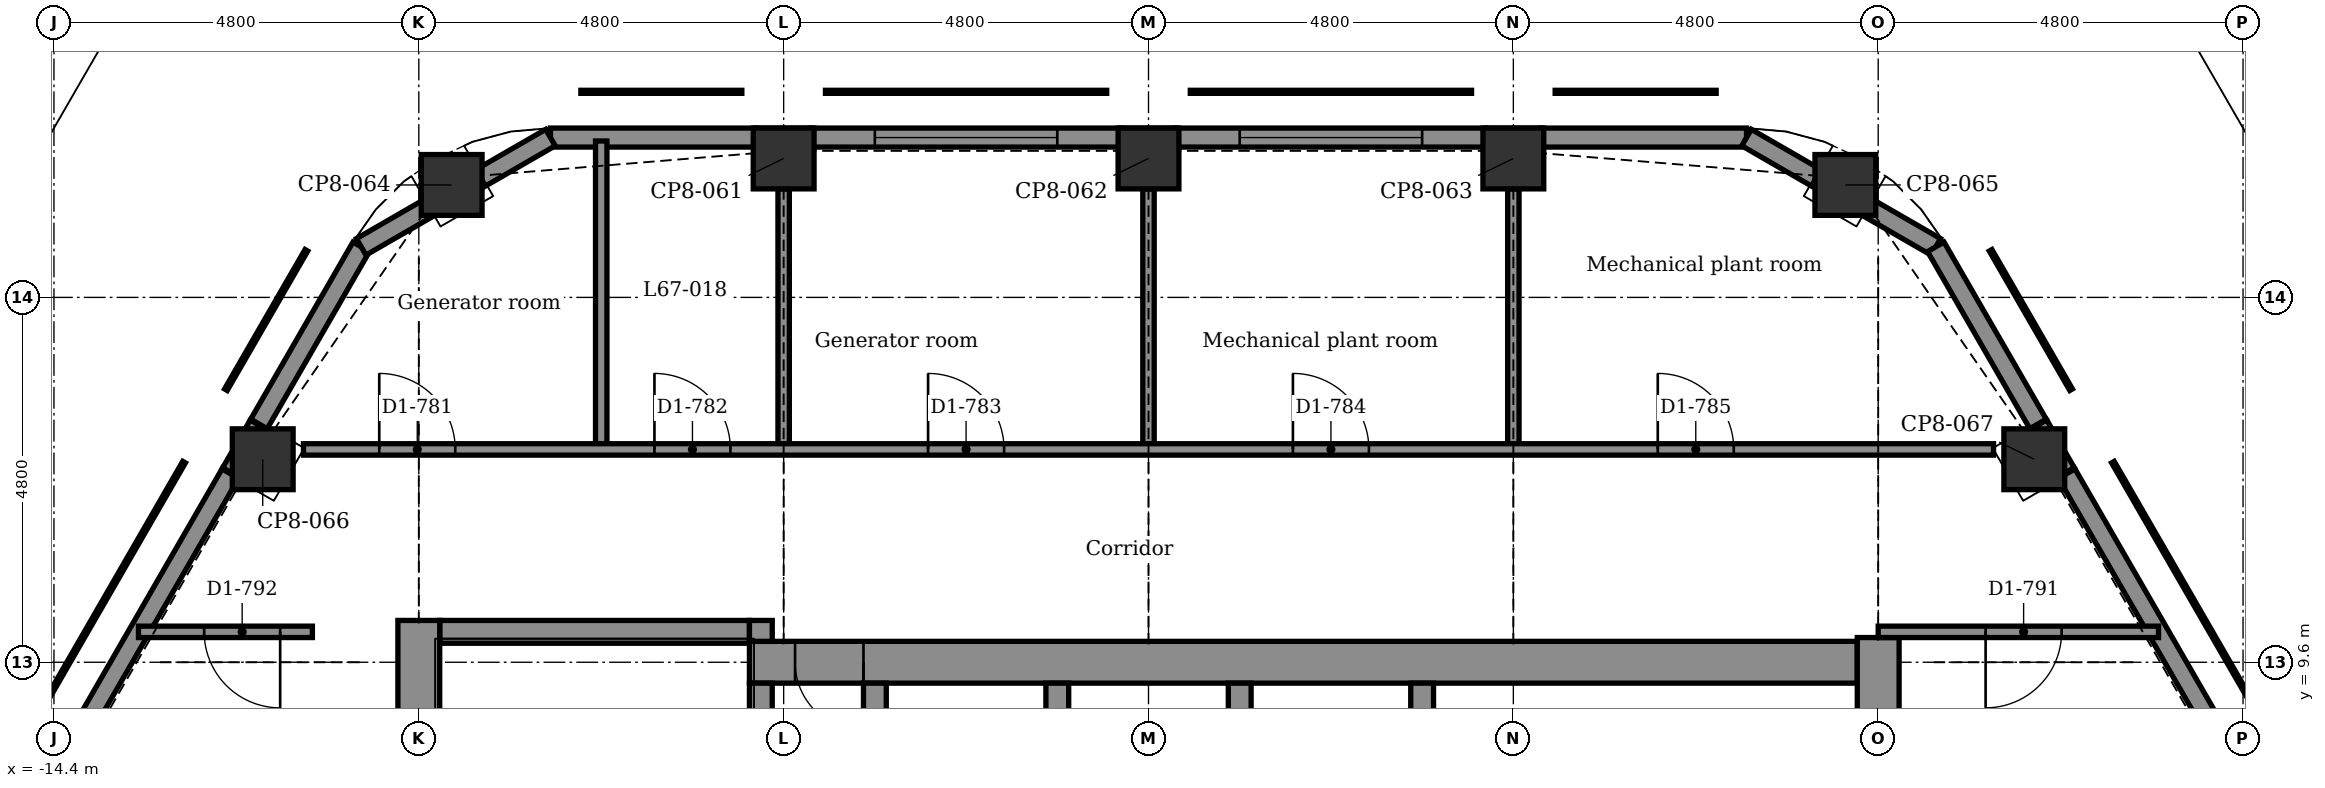
"""IFC4 building model, lengths in metres.
Left out: names, types, materials, properties, quantities, classifications, styles, units other than length and angle.
Written with IfcOpenShell. Run it as: python <this file> out.ifc"""

import sys

from ifc_helpers import new_model, si_unit, direction, frame, frame_2d, origin, origin_2d, place, context, subcontext, project, spatial, rectangle, extrude, element, fill, save


model = new_model("IFC4")
c1 = context("Model", 3, precision=1e-05, world=origin(), true_north=direction((0.0, 1.0)))
c2 = subcontext(c1, "Body", "Model", "MODEL_VIEW")
j1 = project(units=[si_unit("LENGTHUNIT", "METRE"), si_unit("PLANEANGLEUNIT", "RADIAN")], contexts=[c1])
p1 = place(None, origin())
s1 = spatial("IfcSite", under=j1, at=p1, CompositionType="ELEMENT")
p2 = place(p1, origin())
s2 = spatial("IfcBuilding", under=s1, at=p2, CompositionType="ELEMENT")
p3 = place(p2, frame((0.0, 0.0, 296.9)))
s3 = spatial("IfcBuildingStorey", under=s2, at=p3, CompositionType="ELEMENT", Elevation=296.9)
for number, where, z_axis, x_axis in (
    (1, (-9.168, 15.879, -0.3), (0.0, 0.0, 1.0), (0.866, 0.5, 0.0)),
    (2, (-4.8, 16.228, -0.3), (0.0, 0.0, 1.0), (1.0, 0.0, 0.0)),
    (3, (0.0, 16.228, -0.3), (0.0, 0.0, 1.0), (1.0, 0.0, 0.0)),
    (4, (4.8, 16.228, -0.3), (0.0, 0.0, 1.0), (1.0, 0.0, 0.0)),
    (5, (9.168, 15.879, -0.3), (0.0, 0.0, 1.0), (0.5, 0.866, 0.0)),
    (6, (11.654, 12.271, -0.3), (0.0, 0.0, 1.0), (0.866, 0.5, 0.0)),
    (7, (-11.654, 12.271, -0.3), (0.0, 0.0, 1.0), (0.5, 0.866, 0.0)),
):
    element("IfcColumn", number, at=place(p3, frame(where, z_axis=z_axis, x_axis=x_axis)), inside=s3, PredefinedType="COLUMN", context=c2, shape_type="SweptSolid", body=[
        extrude(rectangle(XDim=0.8, YDim=0.8, at=origin_2d()), origin(), (0.0, 0.0, 1.0), 5.0),
    ])
p4 = place(p3, frame((-5.25, 9.6, -0.3), z_axis=(0.0, 0.0, 1.0), x_axis=(1.0, 0.0, 0.0)))
e8 = element("IfcWall", 8, at=p4, inside=s3, PredefinedType="SHEAR", context=c2, shape_type="SweptSolid", body=[
    extrude(rectangle(XDim=14.575, YDim=0.55, at=frame_2d((7.288, 0.0))), origin(), (0.0, 0.0, 1.0), 5.0),
])
p5 = place(p4, frame((0.6, 0.0, 0.3)))
e9 = element("IfcOpeningElement", 9, at=p5, cuts=e8, PredefinedType="OPENING", context=c2, shape_type="SweptSolid", body=[
    extrude(rectangle(XDim=0.9, YDim=2.1, at=frame_2d((0.45, 1.05))), frame((0.0, 0.285, 0.0), z_axis=(0.0, -1.0, 0.0), x_axis=(1.0, 0.0, 0.0)), (0.0, 0.0, 1.0), 0.57),
])
p6 = place(p3, frame((-9.325, 10.0, -0.3), z_axis=(0.0, 0.0, 1.0), x_axis=(1.0, 0.0, 0.0)))
e10 = element("IfcWall", 10, at=p6, inside=s3, PredefinedType="STANDARD", context=c2, shape_type="SweptSolid", body=[
    extrude(rectangle(XDim=4.075, YDim=0.3, at=frame_2d((2.038, 0.0))), origin(), (0.0, 0.0, 1.0), 5.0),
])
p7 = place(p3, frame((-9.6, 2.55, -0.3), z_axis=(0.0, 0.0, 1.0), x_axis=(0.0, 1.0, 0.0)))
e11 = element("IfcWall", 11, at=p7, inside=s3, PredefinedType="SHEAR", context=c2, shape_type="SweptSolid", body=[
    extrude(rectangle(XDim=7.6, YDim=0.55, at=frame_2d((3.8, 0.0))), origin(), (0.0, 0.0, 1.0), 5.0),
])
p8 = place(p3, frame((-5.1, 2.25, -0.3), z_axis=(0.0, 0.0, 1.0), x_axis=(0.0, 1.0, 0.0)))
e12 = element("IfcWall", 12, at=p8, inside=s3, PredefinedType="STANDARD", context=c2, shape_type="SweptSolid", body=[
    extrude(rectangle(XDim=7.075, YDim=0.3, at=frame_2d((3.538, 0.0))), origin(), (0.0, 0.0, 1.0), 5.0),
])
p9 = place(p8, frame((2.0, 0.0, 0.3)))
e13 = element("IfcOpeningElement", 13, at=p9, cuts=e12, PredefinedType="OPENING", context=c2, shape_type="SweptSolid", body=[
    extrude(rectangle(XDim=1.2, YDim=2.1, at=frame_2d((0.6, 1.05))), frame((0.0, 0.16, 0.0), z_axis=(0.0, -1.0, 0.0), x_axis=(1.0, 0.0, 0.0)), (0.0, 0.0, 1.0), 0.32),
])
p10 = place(p3, frame((-5.1, 9.875, -0.3), z_axis=(0.0, 0.0, 1.0), x_axis=(0.0, 1.0, 0.0)))
e14 = element("IfcWall", 14, at=p10, inside=s3, PredefinedType="STANDARD", context=c2, shape_type="SweptSolid", body=[
    extrude(rectangle(XDim=0.275, YDim=0.3, at=frame_2d((0.137, 0.0))), origin(), (0.0, 0.0, 1.0), 5.0),
])
for number, where, z_axis, x_axis in (
    (15, (-3.6, 5.85, -0.3), (0.0, 0.0, 1.0), (0.0, 1.0, 0.0)),
    (16, (-1.2, 5.85, -0.3), (0.0, 0.0, 1.0), (0.0, 1.0, 0.0)),
    (17, (1.2, 5.85, -0.3), (0.0, 0.0, 1.0), (0.0, 1.0, 0.0)),
    (18, (3.6, 5.85, -0.3), (0.0, 0.0, 1.0), (0.0, 1.0, 0.0)),
):
    element("IfcWall", number, at=place(p3, frame(where, z_axis=z_axis, x_axis=x_axis)), inside=s3, PredefinedType="STANDARD", context=c2, shape_type="SweptSolid", body=[
        extrude(rectangle(XDim=3.475, YDim=0.3, at=frame_2d((1.737, 0.0))), origin(), (0.0, 0.0, 1.0), 0.8),
    ])
p11 = place(p3, frame((9.6, -10.15, -0.3), z_axis=(0.0, 0.0, 1.0), x_axis=(0.0, 1.0, 0.0)))
e19 = element("IfcWall", 19, at=p11, inside=s3, PredefinedType="SHEAR", context=c2, shape_type="SweptSolid", body=[
    extrude(rectangle(XDim=20.075, YDim=0.55, at=frame_2d((10.038, 0.0))), origin(), (0.0, 0.0, 1.0), 5.0),
])
p12 = place(p3, frame((-4.44, 16.503, 0.0), z_axis=(0.0, 0.0, 1.0), x_axis=(1.0, 0.0, 0.0)))
e20 = element("IfcWall", 20, at=p12, inside=s3, PredefinedType="SOLIDWALL", context=c2, shape_type="SweptSolid", body=[
    extrude(rectangle(XDim=4.08, YDim=0.25, at=frame_2d((2.04, 0.0))), origin(), (0.0, 0.0, 1.0), 3.8),
])
p13 = place(p12, frame((0.84, 0.0, 0.6)))
e21 = element("IfcOpeningElement", 21, at=p13, cuts=e20, PredefinedType="OPENING", context=c2, shape_type="SweptSolid", body=[
    extrude(rectangle(XDim=2.4, YDim=3.0, at=frame_2d((1.2, 1.5))), frame((0.0, 0.135, 0.0), z_axis=(0.0, -1.0, 0.0), x_axis=(1.0, 0.0, 0.0)), (0.0, 0.0, 1.0), 0.27),
])
p14 = place(p3, frame((-7.868, 16.503, 0.0), z_axis=(0.0, 0.0, 1.0), x_axis=(1.0, 0.0, 0.0)))
e22 = element("IfcWall", 22, at=p14, inside=s3, PredefinedType="SOLIDWALL", context=c2, shape_type="SweptSolid", body=[
    extrude(rectangle(XDim=2.701, YDim=0.25, at=frame_2d((1.351, 0.0))), origin(), (0.0, 0.0, 1.0), 3.8),
])
p15 = place(p3, frame((-5.167, 16.503, 0.0), z_axis=(0.0, 0.0, 1.0), x_axis=(1.0, 0.0, 0.0)))
e23 = element("IfcWall", 23, at=p15, inside=s3, PredefinedType="SOLIDWALL", context=c2, shape_type="SweptSolid", body=[
    extrude(rectangle(XDim=0.727, YDim=0.25, at=frame_2d((0.363, 0.0))), origin(), (0.0, 0.0, 1.0), 4.7),
])
p16 = place(p3, frame((-0.36, 16.503, 0.0), z_axis=(0.0, 0.0, 1.0), x_axis=(1.0, 0.0, 0.0)))
e24 = element("IfcWall", 24, at=p16, inside=s3, PredefinedType="SOLIDWALL", context=c2, shape_type="SweptSolid", body=[
    extrude(rectangle(XDim=0.72, YDim=0.25, at=frame_2d((0.36, 0.0))), origin(), (0.0, 0.0, 1.0), 4.7),
])
p17 = place(p3, frame((0.36, 16.503, 0.0), z_axis=(0.0, 0.0, 1.0), x_axis=(1.0, 0.0, 0.0)))
e25 = element("IfcWall", 25, at=p17, inside=s3, PredefinedType="SOLIDWALL", context=c2, shape_type="SweptSolid", body=[
    extrude(rectangle(XDim=4.08, YDim=0.25, at=frame_2d((2.04, 0.0))), origin(), (0.0, 0.0, 1.0), 3.8),
])
p18 = place(p17, frame((0.84, 0.0, 0.6)))
e26 = element("IfcOpeningElement", 26, at=p18, cuts=e25, PredefinedType="OPENING", context=c2, shape_type="SweptSolid", body=[
    extrude(rectangle(XDim=2.4, YDim=3.0, at=frame_2d((1.2, 1.5))), frame((0.0, 0.135, 0.0), z_axis=(0.0, -1.0, 0.0), x_axis=(1.0, 0.0, 0.0)), (0.0, 0.0, 1.0), 0.27),
])
p19 = place(p3, frame((4.44, 16.503, 0.0), z_axis=(0.0, 0.0, 1.0), x_axis=(1.0, 0.0, 0.0)))
e27 = element("IfcWall", 27, at=p19, inside=s3, PredefinedType="SOLIDWALL", context=c2, shape_type="SweptSolid", body=[
    extrude(rectangle(XDim=0.727, YDim=0.25, at=frame_2d((0.363, 0.0))), origin(), (0.0, 0.0, 1.0), 4.7),
])
p20 = place(p3, frame((5.167, 16.503, 0.0), z_axis=(0.0, 0.0, 1.0), x_axis=(1.0, 0.0, 0.0)))
e28 = element("IfcWall", 28, at=p20, inside=s3, PredefinedType="SOLIDWALL", context=c2, shape_type="SweptSolid", body=[
    extrude(rectangle(XDim=2.701, YDim=0.25, at=frame_2d((1.351, 0.0))), origin(), (0.0, 0.0, 1.0), 3.8),
])
p21 = place(p3, frame((7.868, 16.503, 0.0), z_axis=(0.0, 0.0, 1.0), x_axis=(0.866018712932, -0.500011588718, 0.0)))
e29 = element("IfcWall", 29, at=p21, inside=s3, PredefinedType="SOLIDWALL", context=c2, shape_type="SweptSolid", body=[
    extrude(rectangle(XDim=2.875, YDim=0.25, at=frame_2d((1.438, 0.0))), origin(), (0.0, 0.0, 1.0), 4.7),
])
p22 = place(p3, frame((10.358, 15.065, 0.0), z_axis=(0.0, 0.0, 1.0), x_axis=(0.500056239725, -0.865992931329, 0.0)))
e30 = element("IfcWall", 30, at=p22, inside=s3, PredefinedType="SOLIDWALL", context=c2, shape_type="SweptSolid", body=[
    extrude(rectangle(XDim=2.701, YDim=0.25, at=frame_2d((1.351, 0.0))), origin(), (0.0, 0.0, 1.0), 3.8),
])
p23 = place(p3, frame((11.708, 12.726, 0.0), z_axis=(0.0, 0.0, 1.0), x_axis=(0.499896944627, -0.866084894657, 0.0)))
e31 = element("IfcWall", 31, at=p23, inside=s3, PredefinedType="SOLIDWALL", context=c2, shape_type="SweptSolid", body=[
    extrude(rectangle(XDim=0.727, YDim=0.25, at=frame_2d((0.363, 0.0))), origin(), (0.0, 0.0, 1.0), 4.7),
])
for number, where, z_axis, x_axis in (
    (32, (12.072, 12.096, 0.0), (0.0, 0.0, 1.0), (0.5, -0.866, 0.0)),
    (33, (-14.112, 8.563, 0.0), (0.0, 0.0, 1.0), (0.5, 0.866, 0.0)),
):
    element("IfcWall", number, at=place(p3, frame(where, z_axis=z_axis, x_axis=x_axis)), inside=s3, PredefinedType="SOLIDWALL", context=c2, shape_type="SweptSolid", body=[
        extrude(rectangle(XDim=4.08, YDim=0.25, at=frame_2d((2.04, 0.0))), origin(), (0.0, 0.0, 1.0), 3.8),
    ])
p24 = place(p3, frame((-12.072, 12.096, 0.0), z_axis=(0.0, 0.0, 1.0), x_axis=(0.499896944627, 0.866084894657, 0.0)))
e34 = element("IfcWall", 34, at=p24, inside=s3, PredefinedType="SOLIDWALL", context=c2, shape_type="SweptSolid", body=[
    extrude(rectangle(XDim=0.727, YDim=0.25, at=frame_2d((0.363, 0.0))), origin(), (0.0, 0.0, 1.0), 4.7),
])
p25 = place(p3, frame((-11.708, 12.726, 0.0), z_axis=(0.0, 0.0, 1.0), x_axis=(0.500056239725, 0.865992931329, 0.0)))
e35 = element("IfcWall", 35, at=p25, inside=s3, PredefinedType="SOLIDWALL", context=c2, shape_type="SweptSolid", body=[
    extrude(rectangle(XDim=2.701, YDim=0.25, at=frame_2d((1.351, 0.0))), origin(), (0.0, 0.0, 1.0), 3.8),
])
p26 = place(p3, frame((-10.358, 15.065, 0.0), z_axis=(0.0, 0.0, 1.0), x_axis=(0.866018712932, 0.500011588718, 0.0)))
e36 = element("IfcWall", 36, at=p26, inside=s3, PredefinedType="SOLIDWALL", context=c2, shape_type="SweptSolid", body=[
    extrude(rectangle(XDim=2.875, YDim=0.25, at=frame_2d((1.438, 0.0))), origin(), (0.0, 0.0, 1.0), 4.7),
])
for number, where, z_axis, x_axis in (
    (37, (4.8, 12.4, 0.0), (0.0, 0.0, 1.0), (0.0, 1.0, 0.0)),
    (38, (0.0, 12.4, 0.0), (0.0, 0.0, 1.0), (0.0, 1.0, 0.0)),
    (39, (-4.8, 12.4, 0.0), (0.0, 0.0, 1.0), (0.0, 1.0, 0.0)),
):
    element("IfcWall", number, at=place(p3, frame(where, z_axis=z_axis, x_axis=x_axis)), inside=s3, PredefinedType="PARTITIONING", context=c2, shape_type="SweptSolid", body=[
        extrude(rectangle(XDim=3.428, YDim=0.15, at=frame_2d((1.714, 0.0))), origin(), (0.0, 0.0, 1.0), 4.39),
    ])
p27 = place(p3, frame((-7.2, 12.4, 0.0), z_axis=(0.0, 0.0, 1.0), x_axis=(0.0, 1.0, 0.0)))
e40 = element("IfcWall", 40, at=p27, inside=s3, PredefinedType="PARTITIONING", context=c2, shape_type="SweptSolid", body=[
    extrude(rectangle(XDim=4.058, YDim=0.15, at=frame_2d((2.029, 0.0))), origin(), (0.0, 0.0, 1.0), 4.7),
])
p28 = place(p3, frame((-13.288, 10.0, 0.0), z_axis=(0.0, 0.0, 1.0), x_axis=(1.0, 0.0, 0.0)))
e41 = element("IfcWall", 41, at=p28, inside=s3, PredefinedType="PARTITIONING", context=c2, shape_type="SweptSolid", body=[
    extrude(rectangle(XDim=2.288, YDim=0.15, at=frame_2d((1.144, 0.0))), origin(), (0.0, 0.0, 1.0), 4.7),
])
p29 = place(p28, frame((0.864, 0.0, 0.0)))
e42 = element("IfcOpeningElement", 42, at=p29, cuts=e41, PredefinedType="OPENING", context=c2, shape_type="SweptSolid", body=[
    extrude(rectangle(XDim=1.0, YDim=2.1, at=frame_2d((0.5, 1.05))), frame((0.0, 0.085, 0.0), z_axis=(0.0, -1.0, 0.0), x_axis=(1.0, 0.0, 0.0)), (0.0, 0.0, 1.0), 0.17),
])
p30 = place(p3, frame((9.6, 10.0, 0.0), z_axis=(0.0, 0.0, 1.0), x_axis=(1.0, 0.0, 0.0)))
e43 = element("IfcWall", 43, at=p30, inside=s3, PredefinedType="PARTITIONING", context=c2, shape_type="SweptSolid", body=[
    extrude(rectangle(XDim=3.688, YDim=0.15, at=frame_2d((1.844, 0.0))), origin(), (0.0, 0.0, 1.0), 4.7),
])
p31 = place(p30, frame((1.413, 0.0, 0.0)))
e44 = element("IfcOpeningElement", 44, at=p31, cuts=e43, PredefinedType="OPENING", context=c2, shape_type="SweptSolid", body=[
    extrude(rectangle(XDim=1.0, YDim=2.1, at=frame_2d((0.5, 1.05))), frame((0.0, 0.085, 0.0), z_axis=(0.0, -1.0, 0.0), x_axis=(1.0, 0.0, 0.0)), (0.0, 0.0, 1.0), 0.17),
])
p32 = place(p3, frame((-11.117, 12.4, 0.0), z_axis=(0.0, 0.0, 1.0), x_axis=(1.0, 0.0, 0.0)))
e45 = element("IfcWall", 45, at=p32, inside=s3, PredefinedType="PARTITIONING", context=c2, shape_type="SweptSolid", body=[
    extrude(rectangle(XDim=22.234, YDim=0.15, at=frame_2d((11.117, 0.0))), origin(), (0.0, 0.0, 1.0), 4.7),
])
p33 = place(p32, frame((0.997, 0.0, 0.0)))
e46 = element("IfcOpeningElement", 46, at=p33, cuts=e45, PredefinedType="OPENING", context=c2, shape_type="SweptSolid", body=[
    extrude(rectangle(XDim=1.0, YDim=2.1, at=frame_2d((0.5, 1.05))), frame((0.0, 0.085, 0.0), z_axis=(0.0, -1.0, 0.0), x_axis=(1.0, 0.0, 0.0)), (0.0, 0.0, 1.0), 0.17),
])
p34 = place(p32, frame((4.617, 0.0, 0.0)))
e47 = element("IfcOpeningElement", 47, at=p34, cuts=e45, PredefinedType="OPENING", context=c2, shape_type="SweptSolid", body=[
    extrude(rectangle(XDim=1.0, YDim=2.1, at=frame_2d((0.5, 1.05))), frame((0.0, 0.085, 0.0), z_axis=(0.0, -1.0, 0.0), x_axis=(1.0, 0.0, 0.0)), (0.0, 0.0, 1.0), 0.17),
])
p35 = place(p32, frame((8.217, 0.0, 0.0)))
e48 = element("IfcOpeningElement", 48, at=p35, cuts=e45, PredefinedType="OPENING", context=c2, shape_type="SweptSolid", body=[
    extrude(rectangle(XDim=1.0, YDim=2.1, at=frame_2d((0.5, 1.05))), frame((0.0, 0.085, 0.0), z_axis=(0.0, -1.0, 0.0), x_axis=(1.0, 0.0, 0.0)), (0.0, 0.0, 1.0), 0.17),
])
p36 = place(p32, frame((13.017, 0.0, 0.0)))
e49 = element("IfcOpeningElement", 49, at=p36, cuts=e45, PredefinedType="OPENING", context=c2, shape_type="SweptSolid", body=[
    extrude(rectangle(XDim=1.0, YDim=2.1, at=frame_2d((0.5, 1.05))), frame((0.0, 0.085, 0.0), z_axis=(0.0, -1.0, 0.0), x_axis=(1.0, 0.0, 0.0)), (0.0, 0.0, 1.0), 0.17),
])
p37 = place(p32, frame((17.817, 0.0, 0.0)))
e50 = element("IfcOpeningElement", 50, at=p37, cuts=e45, PredefinedType="OPENING", context=c2, shape_type="SweptSolid", body=[
    extrude(rectangle(XDim=1.0, YDim=2.1, at=frame_2d((0.5, 1.05))), frame((0.0, 0.085, 0.0), z_axis=(0.0, -1.0, 0.0), x_axis=(1.0, 0.0, 0.0)), (0.0, 0.0, 1.0), 0.17),
])
p38 = place(p33, origin())
e51 = element("IfcDoor", 51, at=p38, inside=s3, OperationType="SINGLE_SWING_LEFT", PredefinedType="DOOR", context=c2, shape_type="SweptSolid", body=[
    extrude(rectangle(XDim=1.0, YDim=2.1, at=frame_2d((0.5, 1.05))), frame((0.0, 0.025, 0.0), z_axis=(0.0, -1.0, 0.0), x_axis=(1.0, 0.0, 0.0)), (0.0, 0.0, 1.0), 0.05),
])
fill(e46, e51)
p39 = place(p34, origin())
e52 = element("IfcDoor", 52, at=p39, inside=s3, OperationType="SINGLE_SWING_LEFT", PredefinedType="DOOR", context=c2, shape_type="SweptSolid", body=[
    extrude(rectangle(XDim=1.0, YDim=2.1, at=frame_2d((0.5, 1.05))), frame((0.0, 0.025, 0.0), z_axis=(0.0, -1.0, 0.0), x_axis=(1.0, 0.0, 0.0)), (0.0, 0.0, 1.0), 0.05),
])
fill(e47, e52)
p40 = place(p35, origin())
e53 = element("IfcDoor", 53, at=p40, inside=s3, OperationType="SINGLE_SWING_LEFT", PredefinedType="DOOR", context=c2, shape_type="SweptSolid", body=[
    extrude(rectangle(XDim=1.0, YDim=2.1, at=frame_2d((0.5, 1.05))), frame((0.0, 0.025, 0.0), z_axis=(0.0, -1.0, 0.0), x_axis=(1.0, 0.0, 0.0)), (0.0, 0.0, 1.0), 0.05),
])
fill(e48, e53)
p41 = place(p36, origin())
e54 = element("IfcDoor", 54, at=p41, inside=s3, OperationType="SINGLE_SWING_LEFT", PredefinedType="DOOR", context=c2, shape_type="SweptSolid", body=[
    extrude(rectangle(XDim=1.0, YDim=2.1, at=frame_2d((0.5, 1.05))), frame((0.0, 0.025, 0.0), z_axis=(0.0, -1.0, 0.0), x_axis=(1.0, 0.0, 0.0)), (0.0, 0.0, 1.0), 0.05),
])
fill(e49, e54)
p42 = place(p37, origin())
e55 = element("IfcDoor", 55, at=p42, inside=s3, OperationType="SINGLE_SWING_LEFT", PredefinedType="DOOR", context=c2, shape_type="SweptSolid", body=[
    extrude(rectangle(XDim=1.0, YDim=2.1, at=frame_2d((0.5, 1.05))), frame((0.0, 0.025, 0.0), z_axis=(0.0, -1.0, 0.0), x_axis=(1.0, 0.0, 0.0)), (0.0, 0.0, 1.0), 0.05),
])
fill(e50, e55)
p43 = place(p31, frame((1.0, 0.0, 0.0), z_axis=(0.0, 0.0, 1.0), x_axis=(-1.0, 0.0, 0.0)))
e56 = element("IfcDoor", 56, at=p43, inside=s3, OperationType="SINGLE_SWING_LEFT", PredefinedType="DOOR", context=c2, shape_type="SweptSolid", body=[
    extrude(rectangle(XDim=1.0, YDim=2.1, at=frame_2d((0.5, 1.05))), frame((0.0, 0.025, 0.0), z_axis=(0.0, -1.0, 0.0), x_axis=(1.0, 0.0, 0.0)), (0.0, 0.0, 1.0), 0.05),
])
fill(e44, e56)
p44 = place(p29, frame((1.0, 0.0, 0.0), z_axis=(0.0, 0.0, 1.0), x_axis=(-1.0, 0.0, 0.0)))
e57 = element("IfcDoor", 57, at=p44, inside=s3, OperationType="SINGLE_SWING_RIGHT", PredefinedType="DOOR", context=c2, shape_type="SweptSolid", body=[
    extrude(rectangle(XDim=1.0, YDim=2.1, at=frame_2d((0.5, 1.05))), frame((0.0, 0.025, 0.0), z_axis=(0.0, -1.0, 0.0), x_axis=(1.0, 0.0, 0.0)), (0.0, 0.0, 1.0), 0.05),
])
fill(e42, e57)
p45 = place(p5, frame((0.9, 0.0, 0.0), z_axis=(0.0, 0.0, 1.0), x_axis=(-1.0, 0.0, 0.0)))
e58 = element("IfcDoor", 58, at=p45, inside=s3, OperationType="SINGLE_SWING_RIGHT", PredefinedType="DOOR", context=c2, shape_type="SweptSolid", body=[
    extrude(rectangle(XDim=0.9, YDim=2.1, at=frame_2d((0.45, 1.05))), frame((0.0, 0.025, 0.0), z_axis=(0.0, -1.0, 0.0), x_axis=(1.0, 0.0, 0.0)), (0.0, 0.0, 1.0), 0.05),
])
fill(e9, e58)
p46 = place(p13, origin())
e59 = element("IfcWindow", 59, at=p46, inside=s3, PartitioningType="SINGLE_PANEL", PredefinedType="WINDOW", context=c2, shape_type="SweptSolid", body=[
    extrude(rectangle(XDim=2.4, YDim=3.0, at=frame_2d((1.2, 1.5))), frame((0.0, 0.03, 0.0), z_axis=(0.0, -1.0, 0.0), x_axis=(1.0, 0.0, 0.0)), (0.0, 0.0, 1.0), 0.06),
])
fill(e21, e59)
p47 = place(p18, origin())
e60 = element("IfcWindow", 60, at=p47, inside=s3, PartitioningType="SINGLE_PANEL", PredefinedType="WINDOW", context=c2, shape_type="SweptSolid", body=[
    extrude(rectangle(XDim=2.4, YDim=3.0, at=frame_2d((1.2, 1.5))), frame((0.0, 0.03, 0.0), z_axis=(0.0, -1.0, 0.0), x_axis=(1.0, 0.0, 0.0)), (0.0, 0.0, 1.0), 0.06),
])
fill(e26, e60)
save(model, sys.argv[1])
